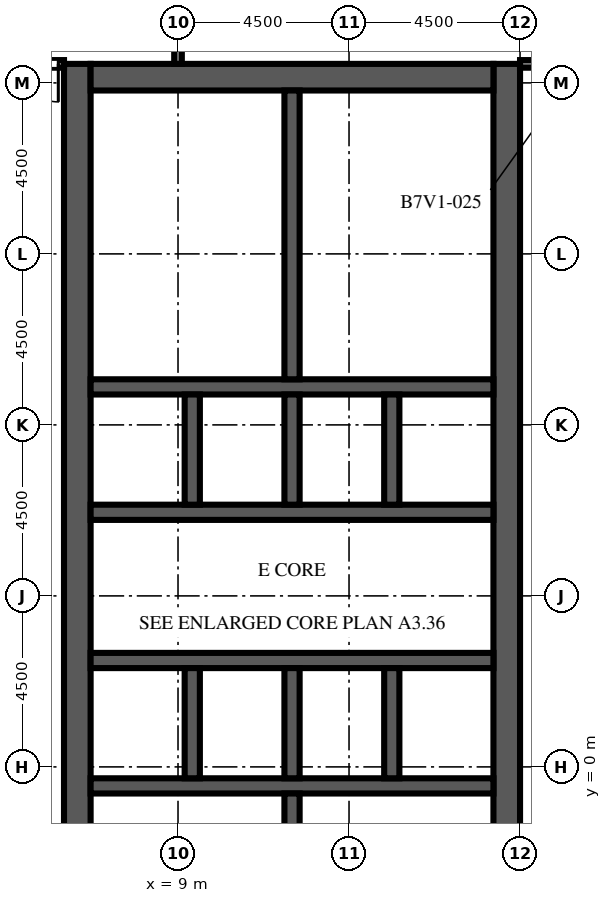
"""IFC4 building model, lengths in metres.
Left out: names, types, materials, properties, quantities, classifications, styles, units other than length and angle.
Written with IfcOpenShell. Run it as: python <this file> out.ifc"""

import sys

from ifc_helpers import new_model, si_unit, direction, frame, frame_2d, origin, place, context, subcontext, project, spatial, rectangle, extrude, element, fill, save


model = new_model("IFC4")
c1 = context("Model", 3, precision=1e-05, world=origin(), true_north=direction((0.0, 1.0)))
c2 = subcontext(c1, "Body", "Model", "MODEL_VIEW")
j1 = project(units=[si_unit("LENGTHUNIT", "METRE"), si_unit("PLANEANGLEUNIT", "RADIAN")], contexts=[c1])
p1 = place(None, origin())
s1 = spatial("IfcSite", under=j1, at=p1, CompositionType="ELEMENT")
p2 = place(p1, origin())
s2 = spatial("IfcBuilding", under=s1, at=p2, CompositionType="ELEMENT")
p3 = place(p2, frame((0.0, 0.0, 248.0)))
s3 = spatial("IfcBuildingStorey", under=s2, at=p3, CompositionType="ELEMENT", Elevation=248.0)
p4 = place(p3, frame((6.35, -9.0, 0.0), z_axis=(0.0, 0.0, 1.0), x_axis=(0.0, 1.0, 0.0)))
e1 = element("IfcWall", 1, at=p4, inside=s3, PredefinedType="SHEAR", context=c2, shape_type="SweptSolid", body=[
    extrude(rectangle(XDim=27.5, YDim=0.7, at=frame_2d((13.75, 0.0))), origin(), (0.0, 0.0, 1.0), 4.1),
])
p5 = place(p4, frame((12.55, 0.0, 0.0)))
e2 = element("IfcOpeningElement", 2, at=p5, cuts=e1, PredefinedType="OPENING", context=c2, shape_type="SweptSolid", body=[
    extrude(rectangle(XDim=2.4, YDim=2.4, at=frame_2d((1.2, 1.2))), frame((0.0, 0.36, 0.0), z_axis=(0.0, -1.0, 0.0), x_axis=(1.0, 0.0, 0.0)), (0.0, 0.0, 1.0), 0.72),
])
p6 = place(p4, frame((3.9, 0.0, 0.0)))
e3 = element("IfcOpeningElement", 3, at=p6, cuts=e1, PredefinedType="OPENING", context=c2, shape_type="SweptSolid", body=[
    extrude(rectangle(XDim=1.2, YDim=2.1, at=frame_2d((0.6, 1.05))), frame((0.0, 0.36, 0.0), z_axis=(0.0, -1.0, 0.0), x_axis=(1.0, 0.0, 0.0)), (0.0, 0.0, 1.0), 0.72),
])
p7 = place(p4, frame((22.4, 0.0, 0.0)))
e4 = element("IfcOpeningElement", 4, at=p7, cuts=e1, PredefinedType="OPENING", context=c2, shape_type="SweptSolid", body=[
    extrude(rectangle(XDim=1.2, YDim=2.1, at=frame_2d((0.6, 1.05))), frame((0.0, 0.36, 0.0), z_axis=(0.0, -1.0, 0.0), x_axis=(1.0, 0.0, 0.0)), (0.0, 0.0, 1.0), 0.72),
])
p8 = place(p3, frame((17.65, -9.0, 0.0), z_axis=(0.0, 0.0, 1.0), x_axis=(0.0, 1.0, 0.0)))
e5 = element("IfcWall", 5, at=p8, inside=s3, PredefinedType="SHEAR", context=c2, shape_type="SweptSolid", body=[
    extrude(rectangle(XDim=27.5, YDim=0.7, at=frame_2d((13.75, 0.0))), origin(), (0.0, 0.0, 1.0), 4.1),
])
p9 = place(p8, frame((12.55, 0.0, 0.0)))
e6 = element("IfcOpeningElement", 6, at=p9, cuts=e5, PredefinedType="OPENING", context=c2, shape_type="SweptSolid", body=[
    extrude(rectangle(XDim=2.4, YDim=2.4, at=frame_2d((1.2, 1.2))), frame((0.0, 0.36, 0.0), z_axis=(0.0, -1.0, 0.0), x_axis=(1.0, 0.0, 0.0)), (0.0, 0.0, 1.0), 0.72),
])
p10 = place(p8, frame((6.825, 0.0, 0.0)))
e7 = element("IfcOpeningElement", 7, at=p10, cuts=e5, PredefinedType="OPENING", context=c2, shape_type="SweptSolid", body=[
    extrude(rectangle(XDim=1.2, YDim=2.1, at=frame_2d((0.6, 1.05))), frame((0.0, 0.36, 0.0), z_axis=(0.0, -1.0, 0.0), x_axis=(1.0, 0.0, 0.0)), (0.0, 0.0, 1.0), 0.72),
])
p11 = place(p8, frame((19.475, 0.0, 0.0)))
e8 = element("IfcOpeningElement", 8, at=p11, cuts=e5, PredefinedType="OPENING", context=c2, shape_type="SweptSolid", body=[
    extrude(rectangle(XDim=1.2, YDim=2.1, at=frame_2d((0.6, 1.05))), frame((0.0, 0.36, 0.0), z_axis=(0.0, -1.0, 0.0), x_axis=(1.0, 0.0, 0.0)), (0.0, 0.0, 1.0), 0.72),
])
p12 = place(p3, frame((6.7, 18.15, 0.0), z_axis=(0.0, 0.0, 1.0), x_axis=(1.0, 0.0, 0.0)))
e9 = element("IfcWall", 9, at=p12, inside=s3, PredefinedType="SHEAR", context=c2, shape_type="SweptSolid", body=[
    extrude(rectangle(XDim=10.6, YDim=0.7, at=frame_2d((5.3, 0.0))), origin(), (0.0, 0.0, 1.0), 4.1),
])
p13 = place(p3, frame((6.7, -0.5, 0.0), z_axis=(0.0, 0.0, 1.0), x_axis=(1.0, 0.0, 0.0)))
e10 = element("IfcWall", 10, at=p13, inside=s3, PredefinedType="SHEAR", context=c2, shape_type="SweptSolid", body=[
    extrude(rectangle(XDim=10.6, YDim=0.4, at=frame_2d((5.3, 0.0))), origin(), (0.0, 0.0, 1.0), 4.1),
])
p14 = place(p3, frame((6.7, 2.8, 0.0), z_axis=(0.0, 0.0, 1.0), x_axis=(1.0, 0.0, 0.0)))
e11 = element("IfcWall", 11, at=p14, inside=s3, PredefinedType="SHEAR", context=c2, shape_type="SweptSolid", body=[
    extrude(rectangle(XDim=10.6, YDim=0.4, at=frame_2d((5.3, 0.0))), origin(), (0.0, 0.0, 1.0), 4.1),
])
p15 = place(p14, frame((0.688, 0.0, 0.0)))
e12 = element("IfcOpeningElement", 12, at=p15, cuts=e11, PredefinedType="OPENING", context=c2, shape_type="SweptSolid", body=[
    extrude(rectangle(XDim=1.1, YDim=2.1, at=frame_2d((0.55, 1.05))), frame((0.0, 0.21, 0.0), z_axis=(0.0, -1.0, 0.0), x_axis=(1.0, 0.0, 0.0)), (0.0, 0.0, 1.0), 0.42),
])
p16 = place(p14, frame((3.438, 0.0, 0.0)))
e13 = element("IfcOpeningElement", 13, at=p16, cuts=e11, PredefinedType="OPENING", context=c2, shape_type="SweptSolid", body=[
    extrude(rectangle(XDim=1.1, YDim=2.1, at=frame_2d((0.55, 1.05))), frame((0.0, 0.21, 0.0), z_axis=(0.0, -1.0, 0.0), x_axis=(1.0, 0.0, 0.0)), (0.0, 0.0, 1.0), 0.42),
])
p17 = place(p14, frame((6.113, 0.0, 0.0)))
e14 = element("IfcOpeningElement", 14, at=p17, cuts=e11, PredefinedType="OPENING", context=c2, shape_type="SweptSolid", body=[
    extrude(rectangle(XDim=1.0, YDim=2.1, at=frame_2d((0.5, 1.05))), frame((0.0, 0.21, 0.0), z_axis=(0.0, -1.0, 0.0), x_axis=(1.0, 0.0, 0.0)), (0.0, 0.0, 1.0), 0.42),
])
p18 = place(p14, frame((8.863, 0.0, 0.0)))
e15 = element("IfcOpeningElement", 15, at=p18, cuts=e11, PredefinedType="OPENING", context=c2, shape_type="SweptSolid", body=[
    extrude(rectangle(XDim=1.0, YDim=2.1, at=frame_2d((0.5, 1.05))), frame((0.0, 0.21, 0.0), z_axis=(0.0, -1.0, 0.0), x_axis=(1.0, 0.0, 0.0)), (0.0, 0.0, 1.0), 0.42),
])
p19 = place(p3, frame((6.7, 6.7, 0.0), z_axis=(0.0, 0.0, 1.0), x_axis=(1.0, 0.0, 0.0)))
e16 = element("IfcWall", 16, at=p19, inside=s3, PredefinedType="SHEAR", context=c2, shape_type="SweptSolid", body=[
    extrude(rectangle(XDim=10.6, YDim=0.4, at=frame_2d((5.3, 0.0))), origin(), (0.0, 0.0, 1.0), 4.1),
])
p20 = place(p19, frame((3.438, 0.0, 0.0)))
e17 = element("IfcOpeningElement", 17, at=p20, cuts=e16, PredefinedType="OPENING", context=c2, shape_type="SweptSolid", body=[
    extrude(rectangle(XDim=1.1, YDim=2.1, at=frame_2d((0.55, 1.05))), frame((0.0, 0.21, 0.0), z_axis=(0.0, -1.0, 0.0), x_axis=(1.0, 0.0, 0.0)), (0.0, 0.0, 1.0), 0.42),
])
p21 = place(p19, frame((6.062, 0.0, 0.0)))
e18 = element("IfcOpeningElement", 18, at=p21, cuts=e16, PredefinedType="OPENING", context=c2, shape_type="SweptSolid", body=[
    extrude(rectangle(XDim=1.1, YDim=2.1, at=frame_2d((0.55, 1.05))), frame((0.0, 0.21, 0.0), z_axis=(0.0, -1.0, 0.0), x_axis=(1.0, 0.0, 0.0)), (0.0, 0.0, 1.0), 0.42),
])
p22 = place(p19, frame((8.812, 0.0, 0.0)))
e19 = element("IfcOpeningElement", 19, at=p22, cuts=e16, PredefinedType="OPENING", context=c2, shape_type="SweptSolid", body=[
    extrude(rectangle(XDim=1.1, YDim=2.1, at=frame_2d((0.55, 1.05))), frame((0.0, 0.21, 0.0), z_axis=(0.0, -1.0, 0.0), x_axis=(1.0, 0.0, 0.0)), (0.0, 0.0, 1.0), 0.42),
])
p23 = place(p19, frame((0.738, 0.0, 0.0)))
e20 = element("IfcOpeningElement", 20, at=p23, cuts=e16, PredefinedType="OPENING", context=c2, shape_type="SweptSolid", body=[
    extrude(rectangle(XDim=1.0, YDim=2.1, at=frame_2d((0.5, 1.05))), frame((0.0, 0.21, 0.0), z_axis=(0.0, -1.0, 0.0), x_axis=(1.0, 0.0, 0.0)), (0.0, 0.0, 1.0), 0.42),
])
p24 = place(p3, frame((6.7, 10.0, 0.0), z_axis=(0.0, 0.0, 1.0), x_axis=(1.0, 0.0, 0.0)))
e21 = element("IfcWall", 21, at=p24, inside=s3, PredefinedType="SHEAR", context=c2, shape_type="SweptSolid", body=[
    extrude(rectangle(XDim=10.6, YDim=0.4, at=frame_2d((5.3, 0.0))), origin(), (0.0, 0.0, 1.0), 4.1),
])
for number, where, z_axis, x_axis in (
    (22, (9.375, -0.3, 0.0), (0.0, 0.0, 1.0), (0.0, 1.0, 0.0)),
    (23, (9.375, 6.9, 0.0), (0.0, 0.0, 1.0), (0.0, 1.0, 0.0)),
    (24, (12.0, -0.3, 0.0), (0.0, 0.0, 1.0), (0.0, 1.0, 0.0)),
    (25, (12.0, 6.9, 0.0), (0.0, 0.0, 1.0), (0.0, 1.0, 0.0)),
    (26, (14.625, -0.3, 0.0), (0.0, 0.0, 1.0), (0.0, 1.0, 0.0)),
    (27, (14.625, 6.9, 0.0), (0.0, 0.0, 1.0), (0.0, 1.0, 0.0)),
):
    element("IfcWall", number, at=place(p3, frame(where, z_axis=z_axis, x_axis=x_axis)), inside=s3, PredefinedType="SHEAR", context=c2, shape_type="SweptSolid", body=[
        extrude(rectangle(XDim=2.9, YDim=0.4, at=frame_2d((1.45, 0.0))), origin(), (0.0, 0.0, 1.0), 4.1),
    ])
for number, where, z_axis, x_axis in (
    (28, (12.0, -8.3, 0.0), (0.0, 0.0, 1.0), (0.0, 1.0, 0.0)),
    (29, (12.0, 10.2, 0.0), (0.0, 0.0, 1.0), (0.0, 1.0, 0.0)),
):
    element("IfcWall", number, at=place(p3, frame(where, z_axis=z_axis, x_axis=x_axis)), inside=s3, PredefinedType="SHEAR", context=c2, shape_type="SweptSolid", body=[
        extrude(rectangle(XDim=7.6, YDim=0.4, at=frame_2d((3.8, 0.0))), origin(), (0.0, 0.0, 1.0), 4.1),
    ])
p25 = place(p3, frame((8.2, -3.588, 0.0), z_axis=(0.0, 0.0, 1.0), x_axis=(0.0, 1.0, 0.0)))
e30 = element("IfcWall", 30, at=p25, inside=s3, PredefinedType="PARTITIONING", context=c2, shape_type="SweptSolid", body=[
    extrude(rectangle(XDim=2.888, YDim=0.1, at=frame_2d((1.444, 0.0))), origin(), (0.0, 0.0, 1.0), 3.65),
])
p26 = place(p25, frame((0.944, 0.0, 0.0)))
e31 = element("IfcOpeningElement", 31, at=p26, cuts=e30, PredefinedType="OPENING", context=c2, shape_type="SweptSolid", body=[
    extrude(rectangle(XDim=1.0, YDim=2.1, at=frame_2d((0.5, 1.05))), frame((0.0, 0.06, 0.0), z_axis=(0.0, -1.0, 0.0), x_axis=(1.0, 0.0, 0.0)), (0.0, 0.0, 1.0), 0.12),
])
p27 = place(p3, frame((8.1, 10.2, 0.0), z_axis=(0.0, 0.0, 1.0), x_axis=(0.0, 1.0, 0.0)))
e32 = element("IfcWall", 32, at=p27, inside=s3, PredefinedType="PARTITIONING", context=c2, shape_type="SweptSolid", body=[
    extrude(rectangle(XDim=2.28, YDim=0.1, at=frame_2d((1.14, 0.0))), origin(), (0.0, 0.0, 1.0), 3.65),
])
p28 = place(p27, frame((0.64, 0.0, 0.0)))
e33 = element("IfcOpeningElement", 33, at=p28, cuts=e32, PredefinedType="OPENING", context=c2, shape_type="SweptSolid", body=[
    extrude(rectangle(XDim=1.0, YDim=2.1, at=frame_2d((0.5, 1.05))), frame((0.0, 0.06, 0.0), z_axis=(0.0, -1.0, 0.0), x_axis=(1.0, 0.0, 0.0)), (0.0, 0.0, 1.0), 0.12),
])
p29 = place(p3, frame((8.1, 12.48, 0.0), z_axis=(0.0, 0.0, 1.0), x_axis=(0.0, 1.0, 0.0)))
e34 = element("IfcWall", 34, at=p29, inside=s3, PredefinedType="PARTITIONING", context=c2, shape_type="SweptSolid", body=[
    extrude(rectangle(XDim=2.432, YDim=0.1, at=frame_2d((1.216, 0.0))), origin(), (0.0, 0.0, 1.0), 3.65),
])
p30 = place(p29, frame((0.716, 0.0, 0.0)))
e35 = element("IfcOpeningElement", 35, at=p30, cuts=e34, PredefinedType="OPENING", context=c2, shape_type="SweptSolid", body=[
    extrude(rectangle(XDim=1.0, YDim=2.1, at=frame_2d((0.5, 1.05))), frame((0.0, 0.06, 0.0), z_axis=(0.0, -1.0, 0.0), x_axis=(1.0, 0.0, 0.0)), (0.0, 0.0, 1.0), 0.12),
])
p31 = place(p3, frame((8.1, 14.912, 0.0), z_axis=(0.0, 0.0, 1.0), x_axis=(0.0, 1.0, 0.0)))
e36 = element("IfcWall", 36, at=p31, inside=s3, PredefinedType="PARTITIONING", context=c2, shape_type="SweptSolid", body=[
    extrude(rectangle(XDim=2.888, YDim=0.1, at=frame_2d((1.444, 0.0))), origin(), (0.0, 0.0, 1.0), 3.65),
])
p32 = place(p31, frame((0.944, 0.0, 0.0)))
e37 = element("IfcOpeningElement", 37, at=p32, cuts=e36, PredefinedType="OPENING", context=c2, shape_type="SweptSolid", body=[
    extrude(rectangle(XDim=1.0, YDim=2.1, at=frame_2d((0.5, 1.05))), frame((0.0, 0.06, 0.0), z_axis=(0.0, -1.0, 0.0), x_axis=(1.0, 0.0, 0.0)), (0.0, 0.0, 1.0), 0.12),
])
for number, where, z_axis, x_axis in (
    (38, (8.1, 12.48, 0.0), (0.0, 0.0, 1.0), (1.0, 0.0, 0.0)),
    (39, (8.1, 14.912, 0.0), (0.0, 0.0, 1.0), (1.0, 0.0, 0.0)),
):
    element("IfcWall", number, at=place(p3, frame(where, z_axis=z_axis, x_axis=x_axis)), inside=s3, PredefinedType="PARTITIONING", context=c2, shape_type="SweptSolid", body=[
        extrude(rectangle(XDim=3.7, YDim=0.1, at=frame_2d((1.85, 0.0))), origin(), (0.0, 0.0, 1.0), 3.65),
    ])
p33 = place(p3, frame((9.0, 18.5, 0.0), z_axis=(0.0, 0.0, 1.0), x_axis=(0.0, 1.0, 0.0)))
e40 = element("IfcWall", 40, at=p33, inside=s3, PredefinedType="PARTITIONING", context=c2, shape_type="SweptSolid", body=[
    extrude(rectangle(XDim=3.5, YDim=0.2, at=frame_2d((1.75, 0.0))), origin(), (0.0, 0.0, 1.0), 3.65),
])
p34 = place(p3, frame((1.5, 18.5, 0.0), z_axis=(0.0, 0.0, 1.0), x_axis=(1.0, 0.0, 0.0)))
e41 = element("IfcWall", 41, at=p34, inside=s3, PredefinedType="PARTITIONING", context=c2, shape_type="SweptSolid", body=[
    extrude(rectangle(XDim=4.5, YDim=0.2, at=frame_2d((2.25, 0.0))), origin(), (0.0, 0.0, 1.0), 3.65),
])
p35 = place(p34, frame((1.6, 0.0, 0.0)))
e42 = element("IfcOpeningElement", 42, at=p35, cuts=e41, PredefinedType="OPENING", context=c2, shape_type="SweptSolid", body=[
    extrude(rectangle(XDim=1.0, YDim=2.1, at=frame_2d((0.5, 1.05))), frame((0.0, 0.11, 0.0), z_axis=(0.0, -1.0, 0.0), x_axis=(1.0, 0.0, 0.0)), (0.0, 0.0, 1.0), 0.22),
])
p36 = place(p34, frame((3.35, 0.0, 0.0)))
e43 = element("IfcOpeningElement", 43, at=p36, cuts=e41, PredefinedType="OPENING", context=c2, shape_type="SweptSolid", body=[
    extrude(rectangle(XDim=1.0, YDim=2.1, at=frame_2d((0.5, 1.05))), frame((0.0, 0.11, 0.0), z_axis=(0.0, -1.0, 0.0), x_axis=(1.0, 0.0, 0.0)), (0.0, 0.0, 1.0), 0.22),
])
p37 = place(p3, frame((18.0, 18.5, 0.0), z_axis=(0.0, 0.0, 1.0), x_axis=(1.0, 0.0, 0.0)))
e44 = element("IfcWall", 44, at=p37, inside=s3, PredefinedType="PARTITIONING", context=c2, shape_type="SweptSolid", body=[
    extrude(rectangle(XDim=3.0, YDim=0.2, at=frame_2d((1.5, 0.0))), origin(), (0.0, 0.0, 1.0), 3.65),
])
p38 = place(p37, frame((1.1, 0.0, 0.0)))
e45 = element("IfcOpeningElement", 45, at=p38, cuts=e44, PredefinedType="OPENING", context=c2, shape_type="SweptSolid", body=[
    extrude(rectangle(XDim=1.0, YDim=2.1, at=frame_2d((0.5, 1.05))), frame((0.0, 0.11, 0.0), z_axis=(0.0, -1.0, 0.0), x_axis=(1.0, 0.0, 0.0)), (0.0, 0.0, 1.0), 0.22),
])
p39 = place(p15, origin())
e46 = element("IfcDoor", 46, at=p39, inside=s3, OperationType="DOUBLE_DOOR_SLIDING", PredefinedType="DOOR", context=c2, shape_type="SweptSolid", body=[
    extrude(rectangle(XDim=1.1, YDim=2.1, at=frame_2d((0.55, 1.05))), frame((0.0, 0.025, 0.0), z_axis=(0.0, -1.0, 0.0), x_axis=(1.0, 0.0, 0.0)), (0.0, 0.0, 1.0), 0.05),
])
fill(e12, e46)
p40 = place(p16, origin())
e47 = element("IfcDoor", 47, at=p40, inside=s3, OperationType="DOUBLE_DOOR_SLIDING", PredefinedType="DOOR", context=c2, shape_type="SweptSolid", body=[
    extrude(rectangle(XDim=1.1, YDim=2.1, at=frame_2d((0.55, 1.05))), frame((0.0, 0.025, 0.0), z_axis=(0.0, -1.0, 0.0), x_axis=(1.0, 0.0, 0.0)), (0.0, 0.0, 1.0), 0.05),
])
fill(e13, e47)
p41 = place(p20, origin())
e48 = element("IfcDoor", 48, at=p41, inside=s3, OperationType="DOUBLE_DOOR_SLIDING", PredefinedType="DOOR", context=c2, shape_type="SweptSolid", body=[
    extrude(rectangle(XDim=1.1, YDim=2.1, at=frame_2d((0.55, 1.05))), frame((0.0, 0.025, 0.0), z_axis=(0.0, -1.0, 0.0), x_axis=(1.0, 0.0, 0.0)), (0.0, 0.0, 1.0), 0.05),
])
fill(e17, e48)
p42 = place(p21, origin())
e49 = element("IfcDoor", 49, at=p42, inside=s3, OperationType="DOUBLE_DOOR_SLIDING", PredefinedType="DOOR", context=c2, shape_type="SweptSolid", body=[
    extrude(rectangle(XDim=1.1, YDim=2.1, at=frame_2d((0.55, 1.05))), frame((0.0, 0.025, 0.0), z_axis=(0.0, -1.0, 0.0), x_axis=(1.0, 0.0, 0.0)), (0.0, 0.0, 1.0), 0.05),
])
fill(e18, e49)
p43 = place(p22, origin())
e50 = element("IfcDoor", 50, at=p43, inside=s3, OperationType="DOUBLE_DOOR_SLIDING", PredefinedType="DOOR", context=c2, shape_type="SweptSolid", body=[
    extrude(rectangle(XDim=1.1, YDim=2.1, at=frame_2d((0.55, 1.05))), frame((0.0, 0.025, 0.0), z_axis=(0.0, -1.0, 0.0), x_axis=(1.0, 0.0, 0.0)), (0.0, 0.0, 1.0), 0.05),
])
fill(e19, e50)
p44 = place(p5, origin())
e51 = element("IfcDoor", 51, at=p44, inside=s3, OperationType="DOUBLE_DOOR_DOUBLE_SWING", PredefinedType="DOOR", context=c2, shape_type="SweptSolid", body=[
    extrude(rectangle(XDim=2.4, YDim=2.4, at=frame_2d((1.2, 1.2))), frame((0.0, 0.025, 0.0), z_axis=(0.0, -1.0, 0.0), x_axis=(1.0, 0.0, 0.0)), (0.0, 0.0, 1.0), 0.05),
])
fill(e2, e51)
p45 = place(p9, origin())
e52 = element("IfcDoor", 52, at=p45, inside=s3, OperationType="DOUBLE_DOOR_DOUBLE_SWING", PredefinedType="DOOR", context=c2, shape_type="SweptSolid", body=[
    extrude(rectangle(XDim=2.4, YDim=2.4, at=frame_2d((1.2, 1.2))), frame((0.0, 0.025, 0.0), z_axis=(0.0, -1.0, 0.0), x_axis=(1.0, 0.0, 0.0)), (0.0, 0.0, 1.0), 0.05),
])
fill(e6, e52)
p46 = place(p10, frame((1.2, 0.0, 0.0), z_axis=(0.0, 0.0, 1.0), x_axis=(-1.0, 0.0, 0.0)))
e53 = element("IfcDoor", 53, at=p46, inside=s3, OperationType="SINGLE_SWING_LEFT", PredefinedType="DOOR", context=c2, shape_type="SweptSolid", body=[
    extrude(rectangle(XDim=1.2, YDim=2.1, at=frame_2d((0.6, 1.05))), frame((0.0, 0.025, 0.0), z_axis=(0.0, -1.0, 0.0), x_axis=(1.0, 0.0, 0.0)), (0.0, 0.0, 1.0), 0.05),
])
fill(e7, e53)
p47 = place(p11, frame((1.2, 0.0, 0.0), z_axis=(0.0, 0.0, 1.0), x_axis=(-1.0, 0.0, 0.0)))
e54 = element("IfcDoor", 54, at=p47, inside=s3, OperationType="SINGLE_SWING_LEFT", PredefinedType="DOOR", context=c2, shape_type="SweptSolid", body=[
    extrude(rectangle(XDim=1.2, YDim=2.1, at=frame_2d((0.6, 1.05))), frame((0.0, 0.025, 0.0), z_axis=(0.0, -1.0, 0.0), x_axis=(1.0, 0.0, 0.0)), (0.0, 0.0, 1.0), 0.05),
])
fill(e8, e54)
p48 = place(p17, origin())
e55 = element("IfcDoor", 55, at=p48, inside=s3, OperationType="SINGLE_SWING_LEFT", PredefinedType="DOOR", context=c2, shape_type="SweptSolid", body=[
    extrude(rectangle(XDim=1.0, YDim=2.1, at=frame_2d((0.5, 1.05))), frame((0.0, 0.025, 0.0), z_axis=(0.0, -1.0, 0.0), x_axis=(1.0, 0.0, 0.0)), (0.0, 0.0, 1.0), 0.05),
])
fill(e14, e55)
p49 = place(p18, origin())
e56 = element("IfcDoor", 56, at=p49, inside=s3, OperationType="SINGLE_SWING_RIGHT", PredefinedType="DOOR", context=c2, shape_type="SweptSolid", body=[
    extrude(rectangle(XDim=1.0, YDim=2.1, at=frame_2d((0.5, 1.05))), frame((0.0, 0.025, 0.0), z_axis=(0.0, -1.0, 0.0), x_axis=(1.0, 0.0, 0.0)), (0.0, 0.0, 1.0), 0.05),
])
fill(e15, e56)
p50 = place(p23, origin())
e57 = element("IfcDoor", 57, at=p50, inside=s3, OperationType="SINGLE_SWING_LEFT", PredefinedType="DOOR", context=c2, shape_type="SweptSolid", body=[
    extrude(rectangle(XDim=1.0, YDim=2.1, at=frame_2d((0.5, 1.05))), frame((0.0, 0.025, 0.0), z_axis=(0.0, -1.0, 0.0), x_axis=(1.0, 0.0, 0.0)), (0.0, 0.0, 1.0), 0.05),
])
fill(e20, e57)
p51 = place(p7, origin())
e58 = element("IfcDoor", 58, at=p51, inside=s3, OperationType="SINGLE_SWING_RIGHT", PredefinedType="DOOR", context=c2, shape_type="SweptSolid", body=[
    extrude(rectangle(XDim=1.2, YDim=2.1, at=frame_2d((0.6, 1.05))), frame((0.0, -0.275, 0.0), z_axis=(0.0, -1.0, 0.0), x_axis=(1.0, 0.0, 0.0)), (0.0, 0.0, 1.0), 0.05),
])
fill(e4, e58)
p52 = place(p28, origin())
e59 = element("IfcDoor", 59, at=p52, inside=s3, OperationType="SINGLE_SWING_LEFT", PredefinedType="DOOR", context=c2, shape_type="SweptSolid", body=[
    extrude(rectangle(XDim=1.0, YDim=2.1, at=frame_2d((0.5, 1.05))), frame((0.0, 0.025, 0.0), z_axis=(0.0, -1.0, 0.0), x_axis=(1.0, 0.0, 0.0)), (0.0, 0.0, 1.0), 0.05),
])
fill(e33, e59)
p53 = place(p30, origin())
e60 = element("IfcDoor", 60, at=p53, inside=s3, OperationType="SINGLE_SWING_RIGHT", PredefinedType="DOOR", context=c2, shape_type="SweptSolid", body=[
    extrude(rectangle(XDim=1.0, YDim=2.1, at=frame_2d((0.5, 1.05))), frame((0.0, 0.025, 0.0), z_axis=(0.0, -1.0, 0.0), x_axis=(1.0, 0.0, 0.0)), (0.0, 0.0, 1.0), 0.05),
])
fill(e35, e60)
p54 = place(p32, origin())
e61 = element("IfcDoor", 61, at=p54, inside=s3, OperationType="SINGLE_SWING_LEFT", PredefinedType="DOOR", context=c2, shape_type="SweptSolid", body=[
    extrude(rectangle(XDim=1.0, YDim=2.1, at=frame_2d((0.5, 1.05))), frame((0.0, 0.025, 0.0), z_axis=(0.0, -1.0, 0.0), x_axis=(1.0, 0.0, 0.0)), (0.0, 0.0, 1.0), 0.05),
])
fill(e37, e61)
p55 = place(p36, origin())
e62 = element("IfcDoor", 62, at=p55, inside=s3, OperationType="SINGLE_SWING_RIGHT", PredefinedType="DOOR", context=c2, shape_type="SweptSolid", body=[
    extrude(rectangle(XDim=1.0, YDim=2.1, at=frame_2d((0.5, 1.05))), frame((0.0, 0.025, 0.0), z_axis=(0.0, -1.0, 0.0), x_axis=(1.0, 0.0, 0.0)), (0.0, 0.0, 1.0), 0.05),
])
fill(e43, e62)
save(model, sys.argv[1])
